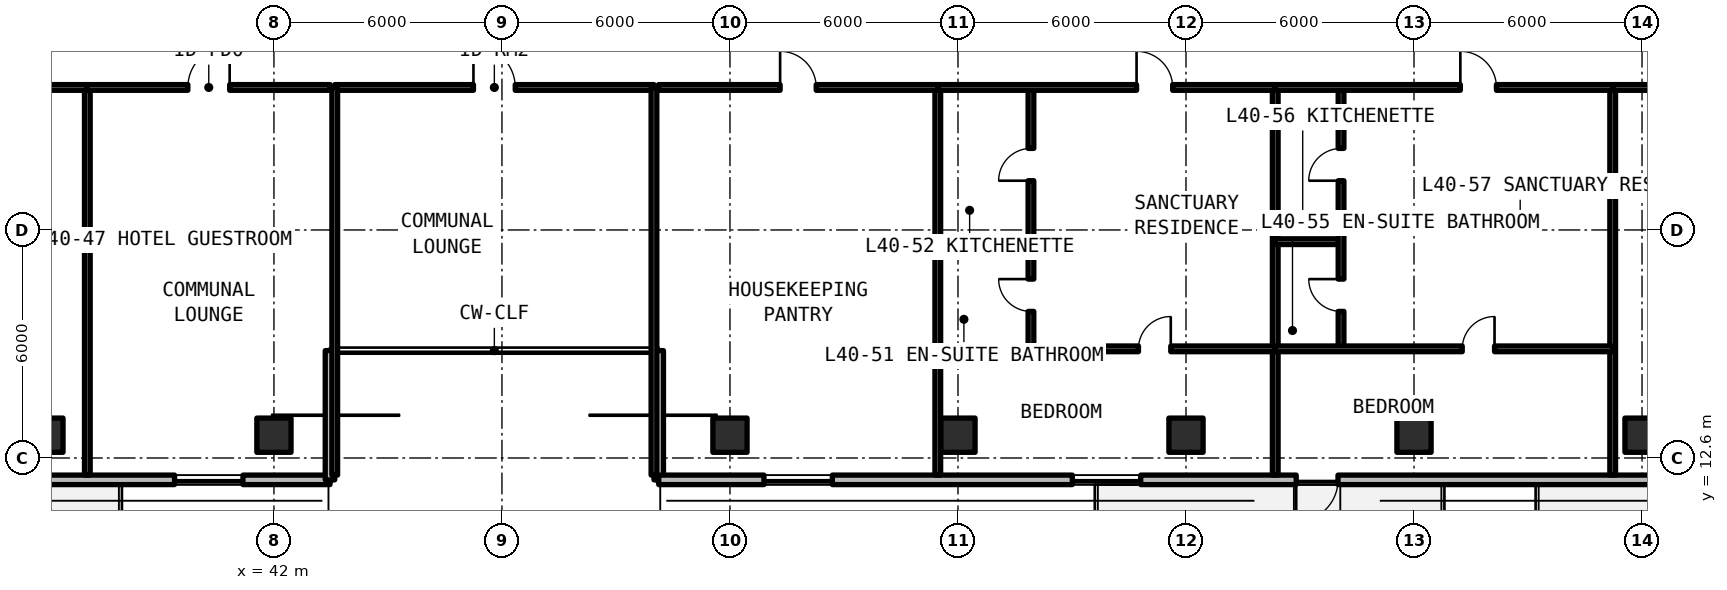
"""IFC4 building model, lengths in metres.
Left out: names, types, materials, properties, quantities, classifications, styles, units other than length and angle.
Written with IfcOpenShell. Run it as: python <this file> out.ifc"""

import sys

from ifc_helpers import new_model, si_unit, direction, frame, frame_2d, origin, origin_2d, place, context, subcontext, project, spatial, rectangle, extrude, element, fill, save


model = new_model("IFC4")
c1 = context("Model", 3, precision=1e-05, world=origin(), true_north=direction((0.0, 1.0)))
c2 = subcontext(c1, "Body", "Model", "MODEL_VIEW")
j1 = project(units=[si_unit("LENGTHUNIT", "METRE"), si_unit("PLANEANGLEUNIT", "RADIAN")], contexts=[c1])
p1 = place(None, origin())
s1 = spatial("IfcSite", under=j1, at=p1, CompositionType="ELEMENT")
p2 = place(p1, origin())
s2 = spatial("IfcBuilding", under=s1, at=p2, CompositionType="ELEMENT")
p3 = place(p2, frame((0.0, 0.0, 145.2)))
s3 = spatial("IfcBuildingStorey", under=s2, at=p3, CompositionType="ELEMENT", Elevation=145.2)
for number, where, z_axis, x_axis in (
    (1, (36.0, 13.2, 0.0), (0.0, 0.0, 1.0), (1.0, 0.0, 0.0)),
    (2, (42.0, 13.2, 0.0), (0.0, 0.0, 1.0), (1.0, 0.0, 0.0)),
    (3, (54.0, 13.2, 0.0), (0.0, 0.0, 1.0), (1.0, 0.0, 0.0)),
    (4, (60.0, 13.2, 0.0), (0.0, 0.0, 1.0), (1.0, 0.0, 0.0)),
    (5, (66.0, 13.2, 0.0), (0.0, 0.0, 1.0), (1.0, 0.0, 0.0)),
    (6, (72.0, 13.2, 0.0), (0.0, 0.0, 1.0), (1.0, 0.0, 0.0)),
    (7, (78.0, 13.2, 0.0), (0.0, 0.0, 1.0), (1.0, 0.0, 0.0)),
):
    element("IfcColumn", number, at=place(p3, frame(where, z_axis=z_axis, x_axis=x_axis)), inside=s3, PredefinedType="COLUMN", context=c2, shape_type="SweptSolid", body=[
        extrude(rectangle(XDim=0.9, YDim=0.9, at=origin_2d()), origin(), (0.0, 0.0, 1.0), 3.3),
    ])
p4 = place(p3, frame((23.852, 12.025, 0.0), z_axis=(0.0, 0.0, 1.0), x_axis=(1.0, 0.0, 0.0)))
e8 = element("IfcWall", 8, at=p4, inside=s3, PredefinedType="SOLIDWALL", context=c2, shape_type="SweptSolid", body=[
    extrude(rectangle(XDim=19.623, YDim=0.25, at=frame_2d((9.812, 0.0))), origin(), (0.0, 0.0, 1.0), 3.08),
])
p5 = place(p4, frame((9.998, 0.0, 0.0)))
e9 = element("IfcOpeningElement", 9, at=p5, cuts=e8, PredefinedType="OPENING", context=c2, shape_type="SweptSolid", body=[
    extrude(rectangle(XDim=1.1, YDim=2.15, at=frame_2d((0.55, 1.075))), frame((0.0, 0.135, 0.0), z_axis=(0.0, -1.0, 0.0), x_axis=(1.0, 0.0, 0.0)), (0.0, 0.0, 1.0), 0.27),
])
p6 = place(p4, frame((2.804, 0.0, 0.78)))
e10 = element("IfcOpeningElement", 10, at=p6, cuts=e8, PredefinedType="OPENING", context=c2, shape_type="SweptSolid", body=[
    extrude(rectangle(XDim=1.8, YDim=1.66, at=frame_2d((0.9, 0.83))), frame((0.0, 0.135, 0.0), z_axis=(0.0, -1.0, 0.0), x_axis=(1.0, 0.0, 0.0)), (0.0, 0.0, 1.0), 0.27),
])
p7 = place(p4, frame((7.861, 0.0, 0.78)))
e11 = element("IfcOpeningElement", 11, at=p7, cuts=e8, PredefinedType="OPENING", context=c2, shape_type="SweptSolid", body=[
    extrude(rectangle(XDim=0.85, YDim=1.65, at=frame_2d((0.425, 0.825))), frame((0.0, 0.135, 0.0), z_axis=(0.0, -1.0, 0.0), x_axis=(1.0, 0.0, 0.0)), (0.0, 0.0, 1.0), 0.27),
])
p8 = place(p4, frame((15.533, 0.0, 0.78)))
e12 = element("IfcOpeningElement", 12, at=p8, cuts=e8, PredefinedType="OPENING", context=c2, shape_type="SweptSolid", body=[
    extrude(rectangle(XDim=1.8, YDim=1.66, at=frame_2d((0.9, 0.83))), frame((0.0, 0.135, 0.0), z_axis=(0.0, -1.0, 0.0), x_axis=(1.0, 0.0, 0.0)), (0.0, 0.0, 1.0), 0.27),
])
for number, where, z_axis, x_axis in (
    (13, (43.475, 12.025, 0.0), (0.0, 0.0, 1.0), (0.0, 1.0, 0.0)),
    (14, (52.125, 15.425, 0.0), (0.0, 0.0, 1.0), (0.0, -1.0, 0.0)),
):
    element("IfcWall", number, at=place(p3, frame(where, z_axis=z_axis, x_axis=x_axis)), inside=s3, PredefinedType="SOLIDWALL", context=c2, shape_type="SweptSolid", body=[
        extrude(rectangle(XDim=3.4, YDim=0.25, at=frame_2d((1.7, 0.0))), origin(), (0.0, 0.0, 1.0), 3.08),
    ])
p9 = place(p3, frame((52.125, 12.025, 0.0), z_axis=(0.0, 0.0, 1.0), x_axis=(1.0, 0.0, 0.0)))
e15 = element("IfcWall", 15, at=p9, inside=s3, PredefinedType="SOLIDWALL", context=c2, shape_type="SweptSolid", body=[
    extrude(rectangle(XDim=43.623, YDim=0.25, at=frame_2d((21.812, 0.0))), origin(), (0.0, 0.0, 1.0), 3.08),
])
p10 = place(p9, frame((16.775, 0.0, 0.0)))
e16 = element("IfcOpeningElement", 16, at=p10, cuts=e15, PredefinedType="OPENING", context=c2, shape_type="SweptSolid", body=[
    extrude(rectangle(XDim=1.1, YDim=2.15, at=frame_2d((0.55, 1.075))), frame((0.0, 0.135, 0.0), z_axis=(0.0, -1.0, 0.0), x_axis=(1.0, 0.0, 0.0)), (0.0, 0.0, 1.0), 0.27),
])
p11 = place(p9, frame((27.625, 0.0, 0.0)))
e17 = element("IfcOpeningElement", 17, at=p11, cuts=e15, PredefinedType="OPENING", context=c2, shape_type="SweptSolid", body=[
    extrude(rectangle(XDim=1.1, YDim=2.15, at=frame_2d((0.55, 1.075))), frame((0.0, 0.135, 0.0), z_axis=(0.0, -1.0, 0.0), x_axis=(1.0, 0.0, 0.0)), (0.0, 0.0, 1.0), 0.27),
])
p12 = place(p9, frame((2.769, 0.0, 0.78)))
e18 = element("IfcOpeningElement", 18, at=p12, cuts=e15, PredefinedType="OPENING", context=c2, shape_type="SweptSolid", body=[
    extrude(rectangle(XDim=1.8, YDim=1.66, at=frame_2d((0.9, 0.83))), frame((0.0, 0.135, 0.0), z_axis=(0.0, -1.0, 0.0), x_axis=(1.0, 0.0, 0.0)), (0.0, 0.0, 1.0), 0.27),
])
p13 = place(p9, frame((10.884, 0.0, 0.78)))
e19 = element("IfcOpeningElement", 19, at=p13, cuts=e15, PredefinedType="OPENING", context=c2, shape_type="SweptSolid", body=[
    extrude(rectangle(XDim=1.8, YDim=1.66, at=frame_2d((0.9, 0.83))), frame((0.0, 0.135, 0.0), z_axis=(0.0, -1.0, 0.0), x_axis=(1.0, 0.0, 0.0)), (0.0, 0.0, 1.0), 0.27),
])
p14 = place(p9, frame((38.775, 0.0, 0.78)))
e20 = element("IfcOpeningElement", 20, at=p14, cuts=e15, PredefinedType="OPENING", context=c2, shape_type="SweptSolid", body=[
    extrude(rectangle(XDim=1.8, YDim=1.66, at=frame_2d((0.9, 0.83))), frame((0.0, 0.135, 0.0), z_axis=(0.0, -1.0, 0.0), x_axis=(1.0, 0.0, 0.0)), (0.0, 0.0, 1.0), 0.27),
])
p15 = place(p3, frame((43.6, 22.35, 0.0), z_axis=(0.0, 0.0, 1.0), x_axis=(1.0, 0.0, 0.0)))
e21 = element("IfcWall", 21, at=p15, inside=s3, PredefinedType="SOLIDWALL", context=c2, shape_type="SweptSolid", body=[
    extrude(rectangle(XDim=8.4, YDim=0.15, at=frame_2d((4.2, 0.0))), origin(), (0.0, 0.0, 1.0), 2.35),
])
p16 = place(p15, frame((3.65, 0.0, 0.0)))
e22 = element("IfcOpeningElement", 22, at=p16, cuts=e21, PredefinedType="OPENING", context=c2, shape_type="SweptSolid", body=[
    extrude(rectangle(XDim=1.1, YDim=2.15, at=frame_2d((0.55, 1.075))), frame((0.0, 0.085, 0.0), z_axis=(0.0, -1.0, 0.0), x_axis=(1.0, 0.0, 0.0)), (0.0, 0.0, 1.0), 0.17),
])
for number, where, z_axis, x_axis in (
    (23, (43.6, 12.15, 0.0), (0.0, 0.0, 1.0), (0.0, 1.0, 0.0)),
    (24, (52.0, 12.15, 0.0), (0.0, 0.0, 1.0), (0.0, 1.0, 0.0)),
    (25, (37.09, 12.15, 0.0), (0.0, 0.0, 1.0), (0.0, 1.0, 0.0)),
):
    element("IfcWall", number, at=place(p3, frame(where, z_axis=z_axis, x_axis=x_axis)), inside=s3, PredefinedType="SOLIDWALL", context=c2, shape_type="SweptSolid", body=[
        extrude(rectangle(XDim=10.2, YDim=0.15, at=frame_2d((5.1, 0.0))), origin(), (0.0, 0.0, 1.0), 2.35),
    ])
p17 = place(p3, frame((31.112, 22.35, 0.0), z_axis=(0.0, 0.0, 1.0), x_axis=(1.0, 0.0, 0.0)))
e26 = element("IfcWall", 26, at=p17, inside=s3, PredefinedType="SOLIDWALL", context=c2, shape_type="SweptSolid", body=[
    extrude(rectangle(XDim=5.978, YDim=0.15, at=frame_2d((2.989, 0.0))), origin(), (0.0, 0.0, 1.0), 2.35),
])
p18 = place(p17, frame((3.57, 0.0, 0.0)))
e27 = element("IfcOpeningElement", 27, at=p18, cuts=e26, PredefinedType="OPENING", context=c2, shape_type="SweptSolid", body=[
    extrude(rectangle(XDim=0.95, YDim=2.15, at=frame_2d((0.475, 1.075))), frame((0.0, 0.085, 0.0), z_axis=(0.0, -1.0, 0.0), x_axis=(1.0, 0.0, 0.0)), (0.0, 0.0, 1.0), 0.17),
])
p19 = place(p3, frame((37.09, 22.35, 0.0), z_axis=(0.0, 0.0, 1.0), x_axis=(1.0, 0.0, 0.0)))
e28 = element("IfcWall", 28, at=p19, inside=s3, PredefinedType="SOLIDWALL", context=c2, shape_type="SweptSolid", body=[
    extrude(rectangle(XDim=6.39, YDim=0.15, at=frame_2d((3.195, 0.0))), origin(), (0.0, 0.0, 1.0), 2.35),
])
p20 = place(p19, frame((2.645, 0.0, 0.0)))
e29 = element("IfcOpeningElement", 29, at=p20, cuts=e28, PredefinedType="OPENING", context=c2, shape_type="SweptSolid", body=[
    extrude(rectangle(XDim=1.1, YDim=2.15, at=frame_2d((0.55, 1.075))), frame((0.0, 0.085, 0.0), z_axis=(0.0, -1.0, 0.0), x_axis=(1.0, 0.0, 0.0)), (0.0, 0.0, 1.0), 0.17),
])
p21 = place(p3, frame((59.469, 12.15, 0.0), z_axis=(0.0, 0.0, 1.0), x_axis=(0.0, 1.0, 0.0)))
e30 = element("IfcWall", 30, at=p21, inside=s3, PredefinedType="SOLIDWALL", context=c2, shape_type="SweptSolid", body=[
    extrude(rectangle(XDim=10.2, YDim=0.15, at=frame_2d((5.1, 0.0))), origin(), (0.0, 0.0, 1.0), 2.35),
])
p22 = place(p3, frame((52.12, 22.35, 0.0), z_axis=(0.0, 0.0, 1.0), x_axis=(1.0, 0.0, 0.0)))
e31 = element("IfcWall", 31, at=p22, inside=s3, PredefinedType="SOLIDWALL", context=c2, shape_type="SweptSolid", body=[
    extrude(rectangle(XDim=7.349, YDim=0.15, at=frame_2d((3.674, 0.0))), origin(), (0.0, 0.0, 1.0), 2.35),
])
p23 = place(p22, frame((3.199, 0.0, 0.0)))
e32 = element("IfcOpeningElement", 32, at=p23, cuts=e31, PredefinedType="OPENING", context=c2, shape_type="SweptSolid", body=[
    extrude(rectangle(XDim=0.95, YDim=2.15, at=frame_2d((0.475, 1.075))), frame((0.0, 0.085, 0.0), z_axis=(0.0, -1.0, 0.0), x_axis=(1.0, 0.0, 0.0)), (0.0, 0.0, 1.0), 0.17),
])
p24 = place(p3, frame((68.348, 12.15, 0.0), z_axis=(0.0, 0.0, 1.0), x_axis=(0.0, 1.0, 0.0)))
e33 = element("IfcWall", 33, at=p24, inside=s3, PredefinedType="SOLIDWALL", context=c2, shape_type="SweptSolid", body=[
    extrude(rectangle(XDim=10.2, YDim=0.15, at=frame_2d((5.1, 0.0))), origin(), (0.0, 0.0, 1.0), 2.35),
])
p25 = place(p3, frame((59.469, 18.292, 0.0), z_axis=(0.0, 0.0, 1.0), x_axis=(1.0, 0.0, 0.0)))
e34 = element("IfcWall", 34, at=p25, inside=s3, PredefinedType="PARTITIONING", context=c2, shape_type="SweptSolid", body=[
    extrude(rectangle(XDim=2.451, YDim=0.15, at=frame_2d((1.226, 0.0))), origin(), (0.0, 0.0, 1.0), 2.35),
])
p26 = place(p3, frame((61.92, 15.472, 0.0), z_axis=(0.0, 0.0, 1.0), x_axis=(0.0, 1.0, 0.0)))
e35 = element("IfcWall", 35, at=p26, inside=s3, PredefinedType="PARTITIONING", context=c2, shape_type="SweptSolid", body=[
    extrude(rectangle(XDim=6.878, YDim=0.15, at=frame_2d((3.439, 0.0))), origin(), (0.0, 0.0, 1.0), 2.35),
])
p27 = place(p26, frame((0.985, 0.0, 0.0)))
e36 = element("IfcOpeningElement", 36, at=p27, cuts=e35, PredefinedType="OPENING", context=c2, shape_type="SweptSolid", body=[
    extrude(rectangle(XDim=0.85, YDim=2.1, at=frame_2d((0.425, 1.05))), frame((0.0, 0.085, 0.0), z_axis=(0.0, -1.0, 0.0), x_axis=(1.0, 0.0, 0.0)), (0.0, 0.0, 1.0), 0.17),
])
p28 = place(p26, frame((4.424, 0.0, 0.0)))
e37 = element("IfcOpeningElement", 37, at=p28, cuts=e35, PredefinedType="OPENING", context=c2, shape_type="SweptSolid", body=[
    extrude(rectangle(XDim=0.85, YDim=2.1, at=frame_2d((0.425, 1.05))), frame((0.0, 0.085, 0.0), z_axis=(0.0, -1.0, 0.0), x_axis=(1.0, 0.0, 0.0)), (0.0, 0.0, 1.0), 0.17),
])
p29 = place(p3, frame((59.469, 15.472, 0.0), z_axis=(0.0, 0.0, 1.0), x_axis=(1.0, 0.0, 0.0)))
e38 = element("IfcWall", 38, at=p29, inside=s3, PredefinedType="PARTITIONING", context=c2, shape_type="SweptSolid", body=[
    extrude(rectangle(XDim=8.88, YDim=0.15, at=frame_2d((4.44, 0.0))), origin(), (0.0, 0.0, 1.0), 2.35),
])
p30 = place(p29, frame((5.281, 0.0, 0.0)))
e39 = element("IfcOpeningElement", 39, at=p30, cuts=e38, PredefinedType="OPENING", context=c2, shape_type="SweptSolid", body=[
    extrude(rectangle(XDim=0.85, YDim=2.1, at=frame_2d((0.425, 1.05))), frame((0.0, 0.085, 0.0), z_axis=(0.0, -1.0, 0.0), x_axis=(1.0, 0.0, 0.0)), (0.0, 0.0, 1.0), 0.17),
])
p31 = place(p3, frame((59.469, 22.35, 0.0), z_axis=(0.0, 0.0, 1.0), x_axis=(1.0, 0.0, 0.0)))
e40 = element("IfcWall", 40, at=p31, inside=s3, PredefinedType="SOLIDWALL", context=c2, shape_type="SweptSolid", body=[
    extrude(rectangle(XDim=8.88, YDim=0.15, at=frame_2d((4.44, 0.0))), origin(), (0.0, 0.0, 1.0), 2.35),
])
p32 = place(p31, frame((5.23, 0.0, 0.0)))
e41 = element("IfcOpeningElement", 41, at=p32, cuts=e40, PredefinedType="OPENING", context=c2, shape_type="SweptSolid", body=[
    extrude(rectangle(XDim=0.95, YDim=2.15, at=frame_2d((0.475, 1.075))), frame((0.0, 0.085, 0.0), z_axis=(0.0, -1.0, 0.0), x_axis=(1.0, 0.0, 0.0)), (0.0, 0.0, 1.0), 0.17),
])
p33 = place(p3, frame((77.228, 12.15, 0.0), z_axis=(0.0, 0.0, 1.0), x_axis=(0.0, 1.0, 0.0)))
e42 = element("IfcWall", 42, at=p33, inside=s3, PredefinedType="SOLIDWALL", context=c2, shape_type="SweptSolid", body=[
    extrude(rectangle(XDim=10.2, YDim=0.15, at=frame_2d((5.1, 0.0))), origin(), (0.0, 0.0, 1.0), 2.35),
])
p34 = place(p3, frame((68.348, 18.292, 0.0), z_axis=(0.0, 0.0, 1.0), x_axis=(1.0, 0.0, 0.0)))
e43 = element("IfcWall", 43, at=p34, inside=s3, PredefinedType="PARTITIONING", context=c2, shape_type="SweptSolid", body=[
    extrude(rectangle(XDim=1.732, YDim=0.15, at=frame_2d((0.866, 0.0))), origin(), (0.0, 0.0, 1.0), 2.35),
])
p35 = place(p3, frame((70.08, 15.472, 0.0), z_axis=(0.0, 0.0, 1.0), x_axis=(0.0, 1.0, 0.0)))
e44 = element("IfcWall", 44, at=p35, inside=s3, PredefinedType="PARTITIONING", context=c2, shape_type="SweptSolid", body=[
    extrude(rectangle(XDim=6.878, YDim=0.15, at=frame_2d((3.439, 0.0))), origin(), (0.0, 0.0, 1.0), 2.35),
])
p36 = place(p35, frame((0.985, 0.0, 0.0)))
e45 = element("IfcOpeningElement", 45, at=p36, cuts=e44, PredefinedType="OPENING", context=c2, shape_type="SweptSolid", body=[
    extrude(rectangle(XDim=0.85, YDim=2.1, at=frame_2d((0.425, 1.05))), frame((0.0, 0.085, 0.0), z_axis=(0.0, -1.0, 0.0), x_axis=(1.0, 0.0, 0.0)), (0.0, 0.0, 1.0), 0.17),
])
p37 = place(p35, frame((4.424, 0.0, 0.0)))
e46 = element("IfcOpeningElement", 46, at=p37, cuts=e44, PredefinedType="OPENING", context=c2, shape_type="SweptSolid", body=[
    extrude(rectangle(XDim=0.85, YDim=2.1, at=frame_2d((0.425, 1.05))), frame((0.0, 0.085, 0.0), z_axis=(0.0, -1.0, 0.0), x_axis=(1.0, 0.0, 0.0)), (0.0, 0.0, 1.0), 0.17),
])
p38 = place(p3, frame((68.348, 15.472, 0.0), z_axis=(0.0, 0.0, 1.0), x_axis=(1.0, 0.0, 0.0)))
e47 = element("IfcWall", 47, at=p38, inside=s3, PredefinedType="PARTITIONING", context=c2, shape_type="SweptSolid", body=[
    extrude(rectangle(XDim=8.88, YDim=0.15, at=frame_2d((4.44, 0.0))), origin(), (0.0, 0.0, 1.0), 2.35),
])
p39 = place(p38, frame((4.921, 0.0, 0.0)))
e48 = element("IfcOpeningElement", 48, at=p39, cuts=e47, PredefinedType="OPENING", context=c2, shape_type="SweptSolid", body=[
    extrude(rectangle(XDim=0.85, YDim=2.1, at=frame_2d((0.425, 1.05))), frame((0.0, 0.085, 0.0), z_axis=(0.0, -1.0, 0.0), x_axis=(1.0, 0.0, 0.0)), (0.0, 0.0, 1.0), 0.17),
])
p40 = place(p3, frame((68.348, 22.35, 0.0), z_axis=(0.0, 0.0, 1.0), x_axis=(1.0, 0.0, 0.0)))
e49 = element("IfcWall", 49, at=p40, inside=s3, PredefinedType="SOLIDWALL", context=c2, shape_type="SweptSolid", body=[
    extrude(rectangle(XDim=8.88, YDim=0.15, at=frame_2d((4.44, 0.0))), origin(), (0.0, 0.0, 1.0), 2.35),
])
p41 = place(p40, frame((4.871, 0.0, 0.0)))
e50 = element("IfcOpeningElement", 50, at=p41, cuts=e49, PredefinedType="OPENING", context=c2, shape_type="SweptSolid", body=[
    extrude(rectangle(XDim=0.95, YDim=2.15, at=frame_2d((0.475, 1.075))), frame((0.0, 0.085, 0.0), z_axis=(0.0, -1.0, 0.0), x_axis=(1.0, 0.0, 0.0)), (0.0, 0.0, 1.0), 0.17),
])
p42 = place(p3, frame((77.228, 22.35, 0.0), z_axis=(0.0, 0.0, 1.0), x_axis=(1.0, 0.0, 0.0)))
e51 = element("IfcWall", 51, at=p42, inside=s3, PredefinedType="SOLIDWALL", context=c2, shape_type="SweptSolid", body=[
    extrude(rectangle(XDim=9.492, YDim=0.15, at=frame_2d((4.746, 0.0))), origin(), (0.0, 0.0, 1.0), 2.35),
])
p43 = place(p42, frame((4.196, 0.0, 0.0)))
e52 = element("IfcOpeningElement", 52, at=p43, cuts=e51, PredefinedType="OPENING", context=c2, shape_type="SweptSolid", body=[
    extrude(rectangle(XDim=1.1, YDim=2.15, at=frame_2d((0.55, 1.075))), frame((0.0, 0.085, 0.0), z_axis=(0.0, -1.0, 0.0), x_axis=(1.0, 0.0, 0.0)), (0.0, 0.0, 1.0), 0.17),
])
p44 = place(p8, origin())
e53 = element("IfcWindow", 53, at=p44, inside=s3, PartitioningType="SINGLE_PANEL", PredefinedType="WINDOW", context=c2, shape_type="SweptSolid", body=[
    extrude(rectangle(XDim=1.8, YDim=1.66, at=frame_2d((0.9, 0.83))), frame((0.0, 0.03, 0.0), z_axis=(0.0, -1.0, 0.0), x_axis=(1.0, 0.0, 0.0)), (0.0, 0.0, 1.0), 0.06),
])
fill(e12, e53)
p45 = place(p10, frame((1.1, 0.0, 0.0), z_axis=(0.0, 0.0, 1.0), x_axis=(-1.0, 0.0, 0.0)))
e54 = element("IfcDoor", 54, at=p45, inside=s3, OperationType="SINGLE_SWING_LEFT", PredefinedType="DOOR", context=c2, shape_type="SweptSolid", body=[
    extrude(rectangle(XDim=1.1, YDim=2.15, at=frame_2d((0.55, 1.075))), frame((0.0, 0.025, 0.0), z_axis=(0.0, -1.0, 0.0), x_axis=(1.0, 0.0, 0.0)), (0.0, 0.0, 1.0), 0.05),
])
fill(e16, e54)
p46 = place(p12, origin())
e55 = element("IfcWindow", 55, at=p46, inside=s3, PartitioningType="SINGLE_PANEL", PredefinedType="WINDOW", context=c2, shape_type="SweptSolid", body=[
    extrude(rectangle(XDim=1.8, YDim=1.66, at=frame_2d((0.9, 0.83))), frame((0.0, 0.03, 0.0), z_axis=(0.0, -1.0, 0.0), x_axis=(1.0, 0.0, 0.0)), (0.0, 0.0, 1.0), 0.06),
])
fill(e18, e55)
p47 = place(p13, origin())
e56 = element("IfcWindow", 56, at=p47, inside=s3, PartitioningType="SINGLE_PANEL", PredefinedType="WINDOW", context=c2, shape_type="SweptSolid", body=[
    extrude(rectangle(XDim=1.8, YDim=1.66, at=frame_2d((0.9, 0.83))), frame((0.0, 0.03, 0.0), z_axis=(0.0, -1.0, 0.0), x_axis=(1.0, 0.0, 0.0)), (0.0, 0.0, 1.0), 0.06),
])
fill(e19, e56)
p48 = place(p16, origin())
e57 = element("IfcDoor", 57, at=p48, inside=s3, OperationType="SINGLE_SWING_LEFT", PredefinedType="DOOR", context=c2, shape_type="SweptSolid", body=[
    extrude(rectangle(XDim=1.1, YDim=2.15, at=frame_2d((0.55, 1.075))), frame((0.0, 0.025, 0.0), z_axis=(0.0, -1.0, 0.0), x_axis=(1.0, 0.0, 0.0)), (0.0, 0.0, 1.0), 0.05),
])
fill(e22, e57)
p49 = place(p20, origin())
e58 = element("IfcDoor", 58, at=p49, inside=s3, OperationType="SINGLE_SWING_RIGHT", PredefinedType="DOOR", context=c2, shape_type="SweptSolid", body=[
    extrude(rectangle(XDim=1.1, YDim=2.15, at=frame_2d((0.55, 1.075))), frame((0.0, 0.025, 0.0), z_axis=(0.0, -1.0, 0.0), x_axis=(1.0, 0.0, 0.0)), (0.0, 0.0, 1.0), 0.05),
])
fill(e29, e58)
p50 = place(p23, origin())
e59 = element("IfcDoor", 59, at=p50, inside=s3, OperationType="SINGLE_SWING_LEFT", PredefinedType="DOOR", context=c2, shape_type="SweptSolid", body=[
    extrude(rectangle(XDim=0.95, YDim=2.15, at=frame_2d((0.475, 1.075))), frame((0.0, 0.025, 0.0), z_axis=(0.0, -1.0, 0.0), x_axis=(1.0, 0.0, 0.0)), (0.0, 0.0, 1.0), 0.05),
])
fill(e32, e59)
p51 = place(p27, origin())
e60 = element("IfcDoor", 60, at=p51, inside=s3, OperationType="SINGLE_SWING_RIGHT", PredefinedType="DOOR", context=c2, shape_type="SweptSolid", body=[
    extrude(rectangle(XDim=0.85, YDim=2.1, at=frame_2d((0.425, 1.05))), frame((0.0, 0.025, 0.0), z_axis=(0.0, -1.0, 0.0), x_axis=(1.0, 0.0, 0.0)), (0.0, 0.0, 1.0), 0.05),
])
fill(e36, e60)
p52 = place(p28, origin())
e61 = element("IfcDoor", 61, at=p52, inside=s3, OperationType="SINGLE_SWING_LEFT", PredefinedType="DOOR", context=c2, shape_type="SweptSolid", body=[
    extrude(rectangle(XDim=0.85, YDim=2.1, at=frame_2d((0.425, 1.05))), frame((0.0, 0.025, 0.0), z_axis=(0.0, -1.0, 0.0), x_axis=(1.0, 0.0, 0.0)), (0.0, 0.0, 1.0), 0.05),
])
fill(e37, e61)
p53 = place(p30, origin())
e62 = element("IfcDoor", 62, at=p53, inside=s3, OperationType="SINGLE_SWING_RIGHT", PredefinedType="DOOR", context=c2, shape_type="SweptSolid", body=[
    extrude(rectangle(XDim=0.85, YDim=2.1, at=frame_2d((0.425, 1.05))), frame((0.0, 0.025, 0.0), z_axis=(0.0, -1.0, 0.0), x_axis=(1.0, 0.0, 0.0)), (0.0, 0.0, 1.0), 0.05),
])
fill(e39, e62)
p54 = place(p32, origin())
e63 = element("IfcDoor", 63, at=p54, inside=s3, OperationType="SINGLE_SWING_LEFT", PredefinedType="DOOR", context=c2, shape_type="SweptSolid", body=[
    extrude(rectangle(XDim=0.95, YDim=2.15, at=frame_2d((0.475, 1.075))), frame((0.0, 0.025, 0.0), z_axis=(0.0, -1.0, 0.0), x_axis=(1.0, 0.0, 0.0)), (0.0, 0.0, 1.0), 0.05),
])
fill(e41, e63)
p55 = place(p36, origin())
e64 = element("IfcDoor", 64, at=p55, inside=s3, OperationType="SINGLE_SWING_RIGHT", PredefinedType="DOOR", context=c2, shape_type="SweptSolid", body=[
    extrude(rectangle(XDim=0.85, YDim=2.1, at=frame_2d((0.425, 1.05))), frame((0.0, 0.025, 0.0), z_axis=(0.0, -1.0, 0.0), x_axis=(1.0, 0.0, 0.0)), (0.0, 0.0, 1.0), 0.05),
])
fill(e45, e64)
p56 = place(p37, origin())
e65 = element("IfcDoor", 65, at=p56, inside=s3, OperationType="SINGLE_SWING_LEFT", PredefinedType="DOOR", context=c2, shape_type="SweptSolid", body=[
    extrude(rectangle(XDim=0.85, YDim=2.1, at=frame_2d((0.425, 1.05))), frame((0.0, 0.025, 0.0), z_axis=(0.0, -1.0, 0.0), x_axis=(1.0, 0.0, 0.0)), (0.0, 0.0, 1.0), 0.05),
])
fill(e46, e65)
p57 = place(p39, origin())
e66 = element("IfcDoor", 66, at=p57, inside=s3, OperationType="SINGLE_SWING_RIGHT", PredefinedType="DOOR", context=c2, shape_type="SweptSolid", body=[
    extrude(rectangle(XDim=0.85, YDim=2.1, at=frame_2d((0.425, 1.05))), frame((0.0, 0.025, 0.0), z_axis=(0.0, -1.0, 0.0), x_axis=(1.0, 0.0, 0.0)), (0.0, 0.0, 1.0), 0.05),
])
fill(e48, e66)
p58 = place(p41, origin())
e67 = element("IfcDoor", 67, at=p58, inside=s3, OperationType="SINGLE_SWING_LEFT", PredefinedType="DOOR", context=c2, shape_type="SweptSolid", body=[
    extrude(rectangle(XDim=0.95, YDim=2.15, at=frame_2d((0.475, 1.075))), frame((0.0, 0.025, 0.0), z_axis=(0.0, -1.0, 0.0), x_axis=(1.0, 0.0, 0.0)), (0.0, 0.0, 1.0), 0.05),
])
fill(e50, e67)
save(model, sys.argv[1])
